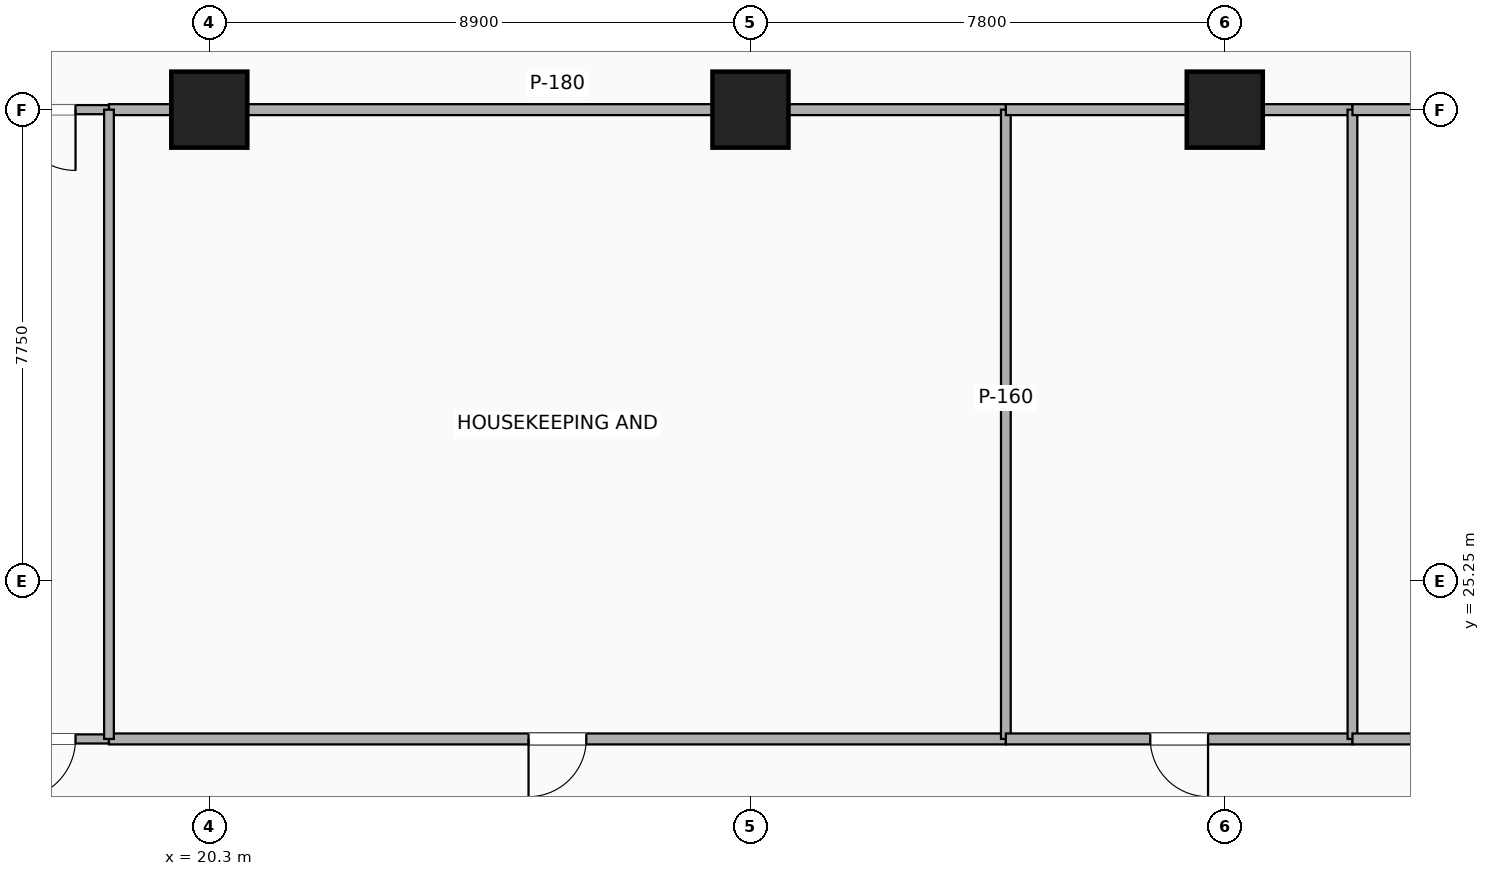
"""IFC4 building model, lengths in metres.
Left out: names, types, materials, properties, quantities, classifications, styles, units other than length and angle.
Written with IfcOpenShell. Run it as: python <this file> out.ifc"""

import sys

from ifc_helpers import new_model, si_unit, direction, frame, frame_2d, origin, origin_2d, place, context, subcontext, project, spatial, rectangle, extrude, element, fill, save


model = new_model("IFC4")
c1 = context("Model", 3, precision=1e-05, world=origin(), true_north=direction((0.0, 1.0)))
c2 = subcontext(c1, "Body", "Model", "MODEL_VIEW")
j1 = project(units=[si_unit("LENGTHUNIT", "METRE"), si_unit("PLANEANGLEUNIT", "RADIAN")], contexts=[c1])
p1 = place(None, origin())
s1 = spatial("IfcSite", under=j1, at=p1, CompositionType="ELEMENT")
p2 = place(p1, origin())
s2 = spatial("IfcBuilding", under=s1, at=p2, CompositionType="ELEMENT")
p3 = place(p2, frame((0.0, 0.0, 98.7)))
s3 = spatial("IfcBuildingStorey", under=s2, at=p3, CompositionType="ELEMENT", Elevation=98.7)
for number, where, z_axis, x_axis in (
    (1, (20.3, 33.0, -0.26), (0.0, 0.0, 1.0), (1.0, 0.0, 0.0)),
    (2, (29.2, 33.0, -0.26), (0.0, 0.0, 1.0), (1.0, 0.0, 0.0)),
    (3, (37.0, 33.0, -0.26), (0.0, 0.0, 1.0), (1.0, 0.0, 0.0)),
):
    element("IfcColumn", number, at=place(p3, frame(where, z_axis=z_axis, x_axis=x_axis)), inside=s3, PredefinedType="COLUMN", context=c2, shape_type="SweptSolid", body=[
        extrude(rectangle(XDim=1.25, YDim=1.25, at=origin_2d()), origin(), (0.0, 0.0, 1.0), 3.5),
    ])
p4 = place(p3, frame((16.65, 22.65, 0.0), z_axis=(0.0, 0.0, 1.0), x_axis=(1.0, 0.0, 0.0)))
e4 = element("IfcWall", 4, at=p4, inside=s3, PredefinedType="PARTITIONING", context=c2, shape_type="SweptSolid", body=[
    extrude(rectangle(XDim=2.0, YDim=0.15, at=frame_2d((1.0, 0.0))), origin(), (0.0, 0.0, 1.0), 3.24),
])
p5 = place(p4, frame((0.45, 0.0, 0.0)))
e5 = element("IfcOpeningElement", 5, at=p5, cuts=e4, PredefinedType="OPENING", context=c2, shape_type="SweptSolid", body=[
    extrude(rectangle(XDim=1.0, YDim=2.15, at=frame_2d((0.5, 1.075))), frame((0.0, 0.085, 0.0), z_axis=(0.0, -1.0, 0.0), x_axis=(1.0, 0.0, 0.0)), (0.0, 0.0, 1.0), 0.17),
])
p6 = place(p3, frame((16.65, 33.0, 0.0), z_axis=(0.0, 0.0, 1.0), x_axis=(1.0, 0.0, 0.0)))
e6 = element("IfcWall", 6, at=p6, inside=s3, PredefinedType="PARTITIONING", context=c2, shape_type="SweptSolid", body=[
    extrude(rectangle(XDim=2.0, YDim=0.15, at=frame_2d((1.0, 0.0))), origin(), (0.0, 0.0, 1.0), 2.313),
])
p7 = place(p6, frame((0.45, 0.0, 0.0)))
e7 = element("IfcOpeningElement", 7, at=p7, cuts=e6, PredefinedType="OPENING", context=c2, shape_type="SweptSolid", body=[
    extrude(rectangle(XDim=1.0, YDim=2.15, at=frame_2d((0.5, 1.075))), frame((0.0, 0.085, 0.0), z_axis=(0.0, -1.0, 0.0), x_axis=(1.0, 0.0, 0.0)), (0.0, 0.0, 1.0), 0.17),
])
p8 = place(p3, frame((18.65, 22.65, 0.0), z_axis=(0.0, 0.0, 1.0), x_axis=(1.0, 0.0, 0.0)))
e8 = element("IfcWall", 8, at=p8, inside=s3, PredefinedType="PARTITIONING", context=c2, shape_type="SweptSolid", body=[
    extrude(rectangle(XDim=14.75, YDim=0.18, at=frame_2d((7.375, 0.0))), origin(), (0.0, 0.0, 1.0), 2.313),
])
p9 = place(p8, frame((6.9, 0.0, 0.0)))
e9 = element("IfcOpeningElement", 9, at=p9, cuts=e8, PredefinedType="OPENING", context=c2, shape_type="SweptSolid", body=[
    extrude(rectangle(XDim=0.95, YDim=2.15, at=frame_2d((0.475, 1.075))), frame((0.0, 0.1, 0.0), z_axis=(0.0, -1.0, 0.0), x_axis=(1.0, 0.0, 0.0)), (0.0, 0.0, 1.0), 0.2),
])
p10 = place(p3, frame((18.65, 33.0, 0.0), z_axis=(0.0, 0.0, 1.0), x_axis=(1.0, 0.0, 0.0)))
e10 = element("IfcWall", 10, at=p10, inside=s3, PredefinedType="PARTITIONING", context=c2, shape_type="SweptSolid", body=[
    extrude(rectangle(XDim=14.75, YDim=0.18, at=frame_2d((7.375, 0.0))), origin(), (0.0, 0.0, 1.0), 2.313),
])
p11 = place(p3, frame((18.65, 22.65, 0.0), z_axis=(0.0, 0.0, 1.0), x_axis=(0.0, 1.0, 0.0)))
e11 = element("IfcWall", 11, at=p11, inside=s3, PredefinedType="PARTITIONING", context=c2, shape_type="SweptSolid", body=[
    extrude(rectangle(XDim=10.35, YDim=0.16, at=frame_2d((5.175, 0.0))), origin(), (0.0, 0.0, 1.0), 2.313),
])
p12 = place(p3, frame((33.4, 22.65, 0.0), z_axis=(0.0, 0.0, 1.0), x_axis=(0.0, 1.0, 0.0)))
e12 = element("IfcWall", 12, at=p12, inside=s3, PredefinedType="PARTITIONING", context=c2, shape_type="SweptSolid", body=[
    extrude(rectangle(XDim=10.35, YDim=0.16, at=frame_2d((5.175, 0.0))), origin(), (0.0, 0.0, 1.0), 2.614),
])
p13 = place(p3, frame((33.4, 22.65, 0.0), z_axis=(0.0, 0.0, 1.0), x_axis=(1.0, 0.0, 0.0)))
e13 = element("IfcWall", 13, at=p13, inside=s3, PredefinedType="PARTITIONING", context=c2, shape_type="SweptSolid", body=[
    extrude(rectangle(XDim=5.7, YDim=0.18, at=frame_2d((2.85, 0.0))), origin(), (0.0, 0.0, 1.0), 2.313),
])
p14 = place(p13, frame((2.375, 0.0, 0.0)))
e14 = element("IfcOpeningElement", 14, at=p14, cuts=e13, PredefinedType="OPENING", context=c2, shape_type="SweptSolid", body=[
    extrude(rectangle(XDim=0.95, YDim=2.15, at=frame_2d((0.475, 1.075))), frame((0.0, 0.1, 0.0), z_axis=(0.0, -1.0, 0.0), x_axis=(1.0, 0.0, 0.0)), (0.0, 0.0, 1.0), 0.2),
])
p15 = place(p3, frame((33.4, 33.0, 0.0), z_axis=(0.0, 0.0, 1.0), x_axis=(1.0, 0.0, 0.0)))
e15 = element("IfcWall", 15, at=p15, inside=s3, PredefinedType="PARTITIONING", context=c2, shape_type="SweptSolid", body=[
    extrude(rectangle(XDim=5.7, YDim=0.18, at=frame_2d((2.85, 0.0))), origin(), (0.0, 0.0, 1.0), 2.313),
])
p16 = place(p3, frame((39.1, 22.65, 0.0), z_axis=(0.0, 0.0, 1.0), x_axis=(0.0, 1.0, 0.0)))
e16 = element("IfcWall", 16, at=p16, inside=s3, PredefinedType="PARTITIONING", context=c2, shape_type="SweptSolid", body=[
    extrude(rectangle(XDim=10.35, YDim=0.16, at=frame_2d((5.175, 0.0))), origin(), (0.0, 0.0, 1.0), 2.614),
])
p17 = place(p3, frame((39.1, 22.65, 0.0), z_axis=(0.0, 0.0, 1.0), x_axis=(1.0, 0.0, 0.0)))
e17 = element("IfcWall", 17, at=p17, inside=s3, PredefinedType="PARTITIONING", context=c2, shape_type="SweptSolid", body=[
    extrude(rectangle(XDim=7.35, YDim=0.18, at=frame_2d((3.675, 0.0))), origin(), (0.0, 0.0, 1.0), 2.313),
])
p18 = place(p17, frame((3.2, 0.0, 0.0)))
e18 = element("IfcOpeningElement", 18, at=p18, cuts=e17, PredefinedType="OPENING", context=c2, shape_type="SweptSolid", body=[
    extrude(rectangle(XDim=0.95, YDim=2.15, at=frame_2d((0.475, 1.075))), frame((0.0, 0.1, 0.0), z_axis=(0.0, -1.0, 0.0), x_axis=(1.0, 0.0, 0.0)), (0.0, 0.0, 1.0), 0.2),
])
p19 = place(p3, frame((39.1, 33.0, 0.0), z_axis=(0.0, 0.0, 1.0), x_axis=(1.0, 0.0, 0.0)))
e19 = element("IfcWall", 19, at=p19, inside=s3, PredefinedType="PARTITIONING", context=c2, shape_type="SweptSolid", body=[
    extrude(rectangle(XDim=7.35, YDim=0.18, at=frame_2d((3.675, 0.0))), origin(), (0.0, 0.0, 1.0), 2.313),
])
p20 = place(p5, origin())
e20 = element("IfcDoor", 20, at=p20, inside=s3, OperationType="SINGLE_SWING_LEFT", PredefinedType="DOOR", context=c2, shape_type="SweptSolid", body=[
    extrude(rectangle(XDim=1.0, YDim=2.15, at=frame_2d((0.5, 1.075))), frame((0.0, 0.025, 0.0), z_axis=(0.0, -1.0, 0.0), x_axis=(1.0, 0.0, 0.0)), (0.0, 0.0, 1.0), 0.05),
])
fill(e5, e20)
p21 = place(p7, origin())
e21 = element("IfcDoor", 21, at=p21, inside=s3, OperationType="SINGLE_SWING_RIGHT", PredefinedType="DOOR", context=c2, shape_type="SweptSolid", body=[
    extrude(rectangle(XDim=1.0, YDim=2.15, at=frame_2d((0.5, 1.075))), frame((0.0, 0.025, 0.0), z_axis=(0.0, -1.0, 0.0), x_axis=(1.0, 0.0, 0.0)), (0.0, 0.0, 1.0), 0.05),
])
fill(e7, e21)
p22 = place(p9, origin())
e22 = element("IfcDoor", 22, at=p22, inside=s3, OperationType="SINGLE_SWING_LEFT", PredefinedType="DOOR", context=c2, shape_type="SweptSolid", body=[
    extrude(rectangle(XDim=0.95, YDim=2.15, at=frame_2d((0.475, 1.075))), frame((0.0, 0.025, 0.0), z_axis=(0.0, -1.0, 0.0), x_axis=(1.0, 0.0, 0.0)), (0.0, 0.0, 1.0), 0.05),
])
fill(e9, e22)
p23 = place(p14, origin())
e23 = element("IfcDoor", 23, at=p23, inside=s3, OperationType="SINGLE_SWING_RIGHT", PredefinedType="DOOR", context=c2, shape_type="SweptSolid", body=[
    extrude(rectangle(XDim=0.95, YDim=2.15, at=frame_2d((0.475, 1.075))), frame((0.0, 0.025, 0.0), z_axis=(0.0, -1.0, 0.0), x_axis=(1.0, 0.0, 0.0)), (0.0, 0.0, 1.0), 0.05),
])
fill(e14, e23)
save(model, sys.argv[1])
